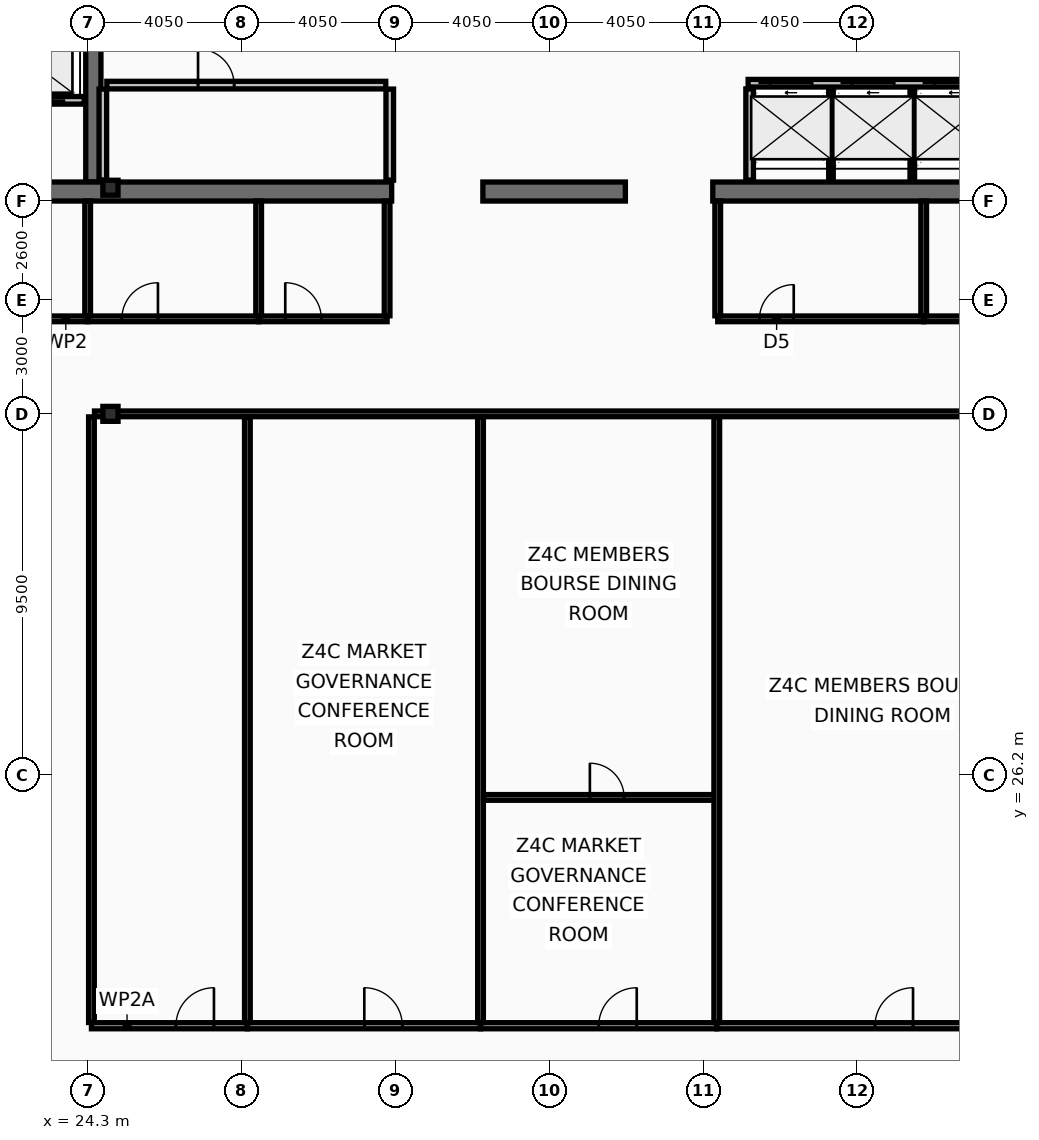
"""IFC4 building model, lengths in metres.
Left out: names, types, materials, properties, quantities, classifications, styles, units other than length and angle.
Written with IfcOpenShell. Run it as: python <this file> out.ifc"""

import sys

from ifc_helpers import new_model, si_unit, direction, frame, frame_2d, origin, origin_2d, place, context, subcontext, project, spatial, rectangle, i_section, extrude, element, fill, save


model = new_model("IFC4")
c1 = context("Model", 3, precision=1e-05, world=origin(), true_north=direction((0.0, 1.0)))
c2 = subcontext(c1, "Body", "Model", "MODEL_VIEW")
j1 = project(units=[si_unit("LENGTHUNIT", "METRE"), si_unit("PLANEANGLEUNIT", "RADIAN")], contexts=[c1])
p1 = place(None, origin())
s1 = spatial("IfcSite", under=j1, at=p1, CompositionType="ELEMENT")
p2 = place(p1, origin())
s2 = spatial("IfcBuilding", under=s1, at=p2, CompositionType="ELEMENT")
p3 = place(p2, frame((0.0, 0.0, 284.2)))
s3 = spatial("IfcBuildingStorey", under=s2, at=p3, CompositionType="ELEMENT", Elevation=284.2)
p4 = place(p3, frame((24.45, 41.8, 0.0), z_axis=(0.0, 0.0, 1.0), x_axis=(0.0, 1.0, 0.0)))
e1 = element("IfcWall", 1, at=p4, inside=s3, PredefinedType="SHEAR", context=c2, shape_type="SweptSolid", body=[
    extrude(rectangle(XDim=11.4, YDim=0.4, at=frame_2d((5.7, 0.0))), origin(), (0.0, 0.0, 1.0), 3.44),
])
p5 = place(p3, frame((32.3, 41.55, 0.0), z_axis=(0.0, 0.0, 1.0), x_axis=(-1.0, 0.0, 0.0)))
e2 = element("IfcWall", 2, at=p5, inside=s3, PredefinedType="SHEAR", context=c2, shape_type="SweptSolid", body=[
    extrude(rectangle(XDim=11.45, YDim=0.5, at=frame_2d((5.725, 0.0))), origin(), (0.0, 0.0, 1.0), 3.44),
])
p6 = place(p3, frame((38.45, 41.55, 0.0), z_axis=(0.0, 0.0, 1.0), x_axis=(-1.0, 0.0, 0.0)))
e3 = element("IfcWall", 3, at=p6, inside=s3, PredefinedType="SHEAR", context=c2, shape_type="SweptSolid", body=[
    extrude(rectangle(XDim=3.75, YDim=0.5, at=frame_2d((1.875, 0.0))), origin(), (0.0, 0.0, 1.0), 3.44),
])
p7 = place(p3, frame((52.05, 41.55, 0.0), z_axis=(0.0, 0.0, 1.0), x_axis=(-1.0, 0.0, 0.0)))
e4 = element("IfcWall", 4, at=p7, inside=s3, PredefinedType="SHEAR", context=c2, shape_type="SweptSolid", body=[
    extrude(rectangle(XDim=11.3, YDim=0.5, at=frame_2d((5.65, 0.0))), origin(), (0.0, 0.0, 1.0), 3.44),
])
for number, where, z_axis, x_axis in (
    (5, (24.9, 35.7, 0.0), (0.0, 0.0, 1.0), (1.0, 0.0, 0.0)),
    (6, (24.9, 41.65, 0.0), (0.0, 0.0, 1.0), (1.0, 0.0, 0.0)),
):
    element("IfcColumn", number, at=place(p3, frame(where, z_axis=z_axis, x_axis=x_axis)), inside=s3, PredefinedType="COLUMN", context=c2, shape_type="SweptSolid", body=[
        extrude(i_section(OverallWidth=0.399, OverallDepth=0.393, WebThickness=0.023, FlangeThickness=0.037, at=origin_2d()), origin(), (0.0, 0.0, 1.0), 3.6),
    ])
p8 = place(p3, frame((41.68, 44.4, 0.0), z_axis=(0.0, 0.0, 1.0), x_axis=(1.0, 0.0, 0.0)))
e7 = element("IfcWall", 7, at=p8, inside=s3, PredefinedType="PARTITIONING", context=c2, shape_type="SweptSolid", body=[
    extrude(rectangle(XDim=6.48, YDim=0.2, at=frame_2d((3.24, 0.0))), origin(), (0.0, 0.0, 1.0), 3.44),
])
p9 = place(p8, frame((0.58, 0.0, 0.0)))
e8 = element("IfcOpeningElement", 8, at=p9, cuts=e7, PredefinedType="OPENING", context=c2, shape_type="SweptSolid", body=[
    extrude(rectangle(XDim=1.1, YDim=2.18, at=frame_2d((0.55, 1.09))), frame((0.0, 0.11, 0.0), z_axis=(0.0, -1.0, 0.0), x_axis=(1.0, 0.0, 0.0)), (0.0, 0.0, 1.0), 0.22),
])
p10 = place(p8, frame((2.74, 0.0, 0.0)))
e9 = element("IfcOpeningElement", 9, at=p10, cuts=e7, PredefinedType="OPENING", context=c2, shape_type="SweptSolid", body=[
    extrude(rectangle(XDim=1.1, YDim=2.18, at=frame_2d((0.55, 1.09))), frame((0.0, 0.11, 0.0), z_axis=(0.0, -1.0, 0.0), x_axis=(1.0, 0.0, 0.0)), (0.0, 0.0, 1.0), 0.22),
])
p11 = place(p8, frame((4.9, 0.0, 0.0)))
e10 = element("IfcOpeningElement", 10, at=p11, cuts=e7, PredefinedType="OPENING", context=c2, shape_type="SweptSolid", body=[
    extrude(rectangle(XDim=1.1, YDim=2.18, at=frame_2d((0.55, 1.09))), frame((0.0, 0.11, 0.0), z_axis=(0.0, -1.0, 0.0), x_axis=(1.0, 0.0, 0.0)), (0.0, 0.0, 1.0), 0.22),
])
p12 = place(p3, frame((24.21, 43.95, 0.0), z_axis=(0.0, 0.0, 1.0), x_axis=(-1.0, 0.0, 0.0)))
e11 = element("IfcWall", 11, at=p12, inside=s3, PredefinedType="PARTITIONING", context=c2, shape_type="SweptSolid", body=[
    extrude(rectangle(XDim=2.97, YDim=0.2, at=frame_2d((1.485, 0.0))), origin(), (0.0, 0.0, 1.0), 3.44),
])
p13 = place(p12, frame((0.86, 0.0, 0.0)))
e12 = element("IfcOpeningElement", 12, at=p13, cuts=e11, PredefinedType="OPENING", context=c2, shape_type="SweptSolid", body=[
    extrude(rectangle(XDim=1.3, YDim=2.18, at=frame_2d((0.65, 1.09))), frame((0.0, 0.11, 0.0), z_axis=(0.0, -1.0, 0.0), x_axis=(1.0, 0.0, 0.0)), (0.0, 0.0, 1.0), 0.22),
])
for number, where, z_axis, x_axis in (
    (13, (24.7, 41.85, 0.0), (0.0, 0.0, 1.0), (0.0, 1.0, 0.0)),
    (14, (32.25, 41.85, 0.0), (0.0, 0.0, 1.0), (0.0, 1.0, 0.0)),
):
    element("IfcWall", number, at=place(p3, frame(where, z_axis=z_axis, x_axis=x_axis)), inside=s3, PredefinedType="PARTITIONING", context=c2, shape_type="SweptSolid", body=[
        extrude(rectangle(XDim=2.395, YDim=0.2, at=frame_2d((1.198, 0.0))), origin(), (0.0, 0.0, 1.0), 3.44),
    ])
p14 = place(p3, frame((24.805, 44.35, 0.0), z_axis=(0.0, 0.0, 1.0), x_axis=(1.0, 0.0, 0.0)))
e15 = element("IfcWall", 15, at=p14, inside=s3, PredefinedType="PARTITIONING", context=c2, shape_type="SweptSolid", body=[
    extrude(rectangle(XDim=7.34, YDim=0.2, at=frame_2d((3.67, 0.0))), origin(), (0.0, 0.0, 1.0), 3.44),
])
p15 = place(p14, frame((2.4, 0.0, 0.0)))
e16 = element("IfcOpeningElement", 16, at=p15, cuts=e15, PredefinedType="OPENING", context=c2, shape_type="SweptSolid", body=[
    extrude(rectangle(XDim=0.95, YDim=2.1, at=frame_2d((0.475, 1.05))), frame((0.0, 0.11, 0.0), z_axis=(0.0, -1.0, 0.0), x_axis=(1.0, 0.0, 0.0)), (0.0, 0.0, 1.0), 0.22),
])
p16 = place(p3, frame((41.72, 41.85, 0.0), z_axis=(0.0, 0.0, 1.0), x_axis=(0.0, 1.0, 0.0)))
e17 = element("IfcWall", 17, at=p16, inside=s3, PredefinedType="PARTITIONING", context=c2, shape_type="SweptSolid", body=[
    extrude(rectangle(XDim=2.4, YDim=0.2, at=frame_2d((1.2, 0.0))), origin(), (0.0, 0.0, 1.0), 3.44),
])
for number, where, z_axis, x_axis in (
    (18, (43.86, 41.85, 0.0), (0.0, 0.0, 1.0), (0.0, 1.0, 0.0)),
    (19, (46.0, 41.85, 0.0), (0.0, 0.0, 1.0), (0.0, 1.0, 0.0)),
):
    element("IfcWall", number, at=place(p3, frame(where, z_axis=z_axis, x_axis=x_axis)), inside=s3, PredefinedType="PARTITIONING", context=c2, shape_type="SweptSolid", body=[
        extrude(rectangle(XDim=2.4, YDim=0.12, at=frame_2d((1.2, 0.0))), origin(), (0.0, 0.0, 1.0), 3.44),
    ])
p17 = place(p3, frame((20.95, 38.2, 0.0), z_axis=(0.0, 0.0, 1.0), x_axis=(1.0, 0.0, 0.0)))
e20 = element("IfcWall", 20, at=p17, inside=s3, PredefinedType="PARTITIONING", context=c2, shape_type="SweptSolid", body=[
    extrude(rectangle(XDim=3.35, YDim=0.15, at=frame_2d((1.675, 0.0))), origin(), (0.0, 0.0, 1.0), 3.44),
])
p18 = place(p17, frame((0.9, 0.0, 0.0)))
e21 = element("IfcOpeningElement", 21, at=p18, cuts=e20, PredefinedType="OPENING", context=c2, shape_type="SweptSolid", body=[
    extrude(rectangle(XDim=0.95, YDim=2.05, at=frame_2d((0.475, 1.025))), frame((0.0, 0.085, 0.0), z_axis=(0.0, -1.0, 0.0), x_axis=(1.0, 0.0, 0.0)), (0.0, 0.0, 1.0), 0.17),
])
p19 = place(p3, frame((24.3, 38.2, 0.0), z_axis=(0.0, 0.0, 1.0), x_axis=(1.0, 0.0, 0.0)))
e22 = element("IfcWall", 22, at=p19, inside=s3, PredefinedType="PARTITIONING", context=c2, shape_type="SweptSolid", body=[
    extrude(rectangle(XDim=4.5, YDim=0.15, at=frame_2d((2.25, 0.0))), origin(), (0.0, 0.0, 1.0), 2.78),
])
p20 = place(p19, frame((0.9, 0.0, 0.0)))
e23 = element("IfcOpeningElement", 23, at=p20, cuts=e22, PredefinedType="OPENING", context=c2, shape_type="SweptSolid", body=[
    extrude(rectangle(XDim=0.95, YDim=2.05, at=frame_2d((0.475, 1.025))), frame((0.0, 0.085, 0.0), z_axis=(0.0, -1.0, 0.0), x_axis=(1.0, 0.0, 0.0)), (0.0, 0.0, 1.0), 0.17),
])
p21 = place(p3, frame((28.8, 38.2, 0.0), z_axis=(0.0, 0.0, 1.0), x_axis=(1.0, 0.0, 0.0)))
e24 = element("IfcWall", 24, at=p21, inside=s3, PredefinedType="PARTITIONING", context=c2, shape_type="SweptSolid", body=[
    extrude(rectangle(XDim=3.38, YDim=0.15, at=frame_2d((1.69, 0.0))), origin(), (0.0, 0.0, 1.0), 2.78),
])
p22 = place(p21, frame((0.7, 0.0, 0.0)))
e25 = element("IfcOpeningElement", 25, at=p22, cuts=e24, PredefinedType="OPENING", context=c2, shape_type="SweptSolid", body=[
    extrude(rectangle(XDim=0.95, YDim=2.05, at=frame_2d((0.475, 1.025))), frame((0.0, 0.085, 0.0), z_axis=(0.0, -1.0, 0.0), x_axis=(1.0, 0.0, 0.0)), (0.0, 0.0, 1.0), 0.17),
])
for number, where, z_axis, x_axis in (
    (26, (24.3, 38.28, 0.0), (0.0, 0.0, 1.0), (0.0, 1.0, 0.0)),
    (27, (28.8, 38.28, 0.0), (0.0, 0.0, 1.0), (0.0, 1.0, 0.0)),
    (28, (32.18, 38.28, 0.0), (0.0, 0.0, 1.0), (0.0, 1.0, 0.0)),
):
    element("IfcWall", number, at=place(p3, frame(where, z_axis=z_axis, x_axis=x_axis)), inside=s3, PredefinedType="PARTITIONING", context=c2, shape_type="SweptSolid", body=[
        extrude(rectangle(XDim=3.02, YDim=0.15, at=frame_2d((1.51, 0.0))), origin(), (0.0, 0.0, 1.0), 3.44),
    ])
p23 = place(p3, frame((40.88, 38.2, 0.0), z_axis=(0.0, 0.0, 1.0), x_axis=(1.0, 0.0, 0.0)))
e29 = element("IfcWall", 29, at=p23, inside=s3, PredefinedType="PARTITIONING", context=c2, shape_type="SweptSolid", body=[
    extrude(rectangle(XDim=5.42, YDim=0.15, at=frame_2d((2.71, 0.0))), origin(), (0.0, 0.0, 1.0), 2.78),
])
p24 = place(p23, frame((1.1, 0.0, 0.0)))
e30 = element("IfcOpeningElement", 30, at=p24, cuts=e29, PredefinedType="OPENING", context=c2, shape_type="SweptSolid", body=[
    extrude(rectangle(XDim=0.9, YDim=2.05, at=frame_2d((0.45, 1.025))), frame((0.0, 0.085, 0.0), z_axis=(0.0, -1.0, 0.0), x_axis=(1.0, 0.0, 0.0)), (0.0, 0.0, 1.0), 0.17),
])
p25 = place(p3, frame((46.3, 38.2, 0.0), z_axis=(0.0, 0.0, 1.0), x_axis=(1.0, 0.0, 0.0)))
e31 = element("IfcWall", 31, at=p25, inside=s3, PredefinedType="PARTITIONING", context=c2, shape_type="SweptSolid", body=[
    extrude(rectangle(XDim=5.65, YDim=0.15, at=frame_2d((2.825, 0.0))), origin(), (0.0, 0.0, 1.0), 2.78),
])
p26 = place(p25, frame((1.1, 0.0, 0.0)))
e32 = element("IfcOpeningElement", 32, at=p26, cuts=e31, PredefinedType="OPENING", context=c2, shape_type="SweptSolid", body=[
    extrude(rectangle(XDim=1.0, YDim=2.05, at=frame_2d((0.5, 1.025))), frame((0.0, 0.085, 0.0), z_axis=(0.0, -1.0, 0.0), x_axis=(1.0, 0.0, 0.0)), (0.0, 0.0, 1.0), 0.17),
])
for number, where, z_axis, x_axis in (
    (33, (40.88, 38.28, 0.0), (0.0, 0.0, 1.0), (0.0, 1.0, 0.0)),
    (34, (46.3, 38.28, 0.0), (0.0, 0.0, 1.0), (0.0, 1.0, 0.0)),
):
    element("IfcWall", number, at=place(p3, frame(where, z_axis=z_axis, x_axis=x_axis)), inside=s3, PredefinedType="PARTITIONING", context=c2, shape_type="SweptSolid", body=[
        extrude(rectangle(XDim=3.02, YDim=0.15, at=frame_2d((1.51, 0.0))), origin(), (0.0, 0.0, 1.0), 3.44),
    ])
p27 = place(p3, frame((24.4, 19.685, 0.0), z_axis=(0.0, 0.0, 1.0), x_axis=(0.0, 1.0, 0.0)))
e35 = element("IfcWall", 35, at=p27, inside=s3, PredefinedType="PARTITIONING", context=c2, shape_type="SweptSolid", body=[
    extrude(rectangle(XDim=15.935, YDim=0.15, at=frame_2d((7.968, 0.0))), origin(), (0.0, 0.0, 1.0), 2.78),
])
p28 = place(p3, frame((24.48, 35.7, 0.0), z_axis=(0.0, 0.0, 1.0), x_axis=(1.0, 0.0, 0.0)))
e36 = element("IfcWall", 36, at=p28, inside=s3, PredefinedType="PARTITIONING", context=c2, shape_type="SweptSolid", body=[
    extrude(rectangle(XDim=25.02, YDim=0.15, at=frame_2d((12.51, 0.0))), origin(), (0.0, 0.0, 1.0), 2.78),
])
p29 = place(p3, frame((24.4, 19.6, 0.0), z_axis=(0.0, 0.0, 1.0), x_axis=(1.0, 0.0, 0.0)))
e37 = element("IfcWall", 37, at=p29, inside=s3, PredefinedType="PARTITIONING", context=c2, shape_type="SweptSolid", body=[
    extrude(rectangle(XDim=4.104, YDim=0.16, at=frame_2d((2.052, 0.0))), origin(), (0.0, 0.0, 1.0), 2.78),
])
p30 = place(p29, frame((2.223, 0.0, 0.0)))
e38 = element("IfcOpeningElement", 38, at=p30, cuts=e37, PredefinedType="OPENING", context=c2, shape_type="SweptSolid", body=[
    extrude(rectangle(XDim=1.0, YDim=2.05, at=frame_2d((0.5, 1.025))), frame((0.0, 0.09, 0.0), z_axis=(0.0, -1.0, 0.0), x_axis=(1.0, 0.0, 0.0)), (0.0, 0.0, 1.0), 0.18),
])
p31 = place(p3, frame((28.503, 19.6, 0.0), z_axis=(0.0, 0.0, 1.0), x_axis=(1.0, 0.0, 0.0)))
e39 = element("IfcWall", 39, at=p31, inside=s3, PredefinedType="PARTITIONING", context=c2, shape_type="SweptSolid", body=[
    extrude(rectangle(XDim=6.135, YDim=0.16, at=frame_2d((3.067, 0.0))), origin(), (0.0, 0.0, 1.0), 2.78),
])
p32 = place(p31, frame((3.077, 0.0, 0.0)))
e40 = element("IfcOpeningElement", 40, at=p32, cuts=e39, PredefinedType="OPENING", context=c2, shape_type="SweptSolid", body=[
    extrude(rectangle(XDim=1.0, YDim=2.05, at=frame_2d((0.5, 1.025))), frame((0.0, 0.09, 0.0), z_axis=(0.0, -1.0, 0.0), x_axis=(1.0, 0.0, 0.0)), (0.0, 0.0, 1.0), 0.18),
])
p33 = place(p3, frame((28.503, 19.685, 0.0), z_axis=(0.0, 0.0, 1.0), x_axis=(0.0, 1.0, 0.0)))
e41 = element("IfcWall", 41, at=p33, inside=s3, PredefinedType="PARTITIONING", context=c2, shape_type="SweptSolid", body=[
    extrude(rectangle(XDim=15.935, YDim=0.15, at=frame_2d((7.968, 0.0))), origin(), (0.0, 0.0, 1.0), 3.03),
])
p34 = place(p3, frame((34.638, 19.6, 0.0), z_axis=(0.0, 0.0, 1.0), x_axis=(1.0, 0.0, 0.0)))
e42 = element("IfcWall", 42, at=p34, inside=s3, PredefinedType="PARTITIONING", context=c2, shape_type="SweptSolid", body=[
    extrude(rectangle(XDim=6.217, YDim=0.16, at=frame_2d((3.108, 0.0))), origin(), (0.0, 0.0, 1.0), 3.44),
])
p35 = place(p34, frame((3.111, 0.0, 0.0)))
e43 = element("IfcOpeningElement", 43, at=p35, cuts=e42, PredefinedType="OPENING", context=c2, shape_type="SweptSolid", body=[
    extrude(rectangle(XDim=1.0, YDim=2.05, at=frame_2d((0.5, 1.025))), frame((0.0, 0.09, 0.0), z_axis=(0.0, -1.0, 0.0), x_axis=(1.0, 0.0, 0.0)), (0.0, 0.0, 1.0), 0.18),
])
p36 = place(p3, frame((34.638, 19.685, 0.0), z_axis=(0.0, 0.0, 1.0), x_axis=(0.0, 1.0, 0.0)))
e44 = element("IfcWall", 44, at=p36, inside=s3, PredefinedType="PARTITIONING", context=c2, shape_type="SweptSolid", body=[
    extrude(rectangle(XDim=15.935, YDim=0.15, at=frame_2d((7.968, 0.0))), origin(), (0.0, 0.0, 1.0), 3.03),
])
p37 = place(p3, frame((34.718, 25.607, 0.0), z_axis=(0.0, 0.0, 1.0), x_axis=(1.0, 0.0, 0.0)))
e45 = element("IfcWall", 45, at=p37, inside=s3, PredefinedType="PARTITIONING", context=c2, shape_type="SweptSolid", body=[
    extrude(rectangle(XDim=6.057, YDim=0.15, at=frame_2d((3.028, 0.0))), origin(), (0.0, 0.0, 1.0), 3.44),
])
p38 = place(p37, frame((2.798, 0.0, 0.0)))
e46 = element("IfcOpeningElement", 46, at=p38, cuts=e45, PredefinedType="OPENING", context=c2, shape_type="SweptSolid", body=[
    extrude(rectangle(XDim=0.9, YDim=2.05, at=frame_2d((0.45, 1.025))), frame((0.0, 0.085, 0.0), z_axis=(0.0, -1.0, 0.0), x_axis=(1.0, 0.0, 0.0)), (0.0, 0.0, 1.0), 0.17),
])
p39 = place(p3, frame((40.855, 19.6, 0.0), z_axis=(0.0, 0.0, 1.0), x_axis=(1.0, 0.0, 0.0)))
e47 = element("IfcWall", 47, at=p39, inside=s3, PredefinedType="PARTITIONING", context=c2, shape_type="SweptSolid", body=[
    extrude(rectangle(XDim=8.725, YDim=0.16, at=frame_2d((4.363, 0.0))), origin(), (0.0, 0.0, 1.0), 2.78),
])
p40 = place(p39, frame((4.165, 0.0, 0.0)))
e48 = element("IfcOpeningElement", 48, at=p40, cuts=e47, PredefinedType="OPENING", context=c2, shape_type="SweptSolid", body=[
    extrude(rectangle(XDim=1.0, YDim=2.05, at=frame_2d((0.5, 1.025))), frame((0.0, 0.09, 0.0), z_axis=(0.0, -1.0, 0.0), x_axis=(1.0, 0.0, 0.0)), (0.0, 0.0, 1.0), 0.18),
])
p41 = place(p3, frame((40.855, 19.685, 0.0), z_axis=(0.0, 0.0, 1.0), x_axis=(0.0, 1.0, 0.0)))
e49 = element("IfcWall", 49, at=p41, inside=s3, PredefinedType="PARTITIONING", context=c2, shape_type="SweptSolid", body=[
    extrude(rectangle(XDim=15.935, YDim=0.15, at=frame_2d((7.968, 0.0))), origin(), (0.0, 0.0, 1.0), 3.03),
])
p42 = place(p9, origin())
e50 = element("IfcDoor", 50, at=p42, inside=s3, OperationType="SLIDING_TO_LEFT", PredefinedType="DOOR", context=c2, shape_type="SweptSolid", body=[
    extrude(rectangle(XDim=1.1, YDim=2.18, at=frame_2d((0.55, 1.09))), frame((0.0, 0.025, 0.0), z_axis=(0.0, -1.0, 0.0), x_axis=(1.0, 0.0, 0.0)), (0.0, 0.0, 1.0), 0.05),
])
fill(e8, e50)
p43 = place(p10, origin())
e51 = element("IfcDoor", 51, at=p43, inside=s3, OperationType="SLIDING_TO_LEFT", PredefinedType="DOOR", context=c2, shape_type="SweptSolid", body=[
    extrude(rectangle(XDim=1.1, YDim=2.18, at=frame_2d((0.55, 1.09))), frame((0.0, 0.025, 0.0), z_axis=(0.0, -1.0, 0.0), x_axis=(1.0, 0.0, 0.0)), (0.0, 0.0, 1.0), 0.05),
])
fill(e9, e51)
p44 = place(p11, origin())
e52 = element("IfcDoor", 52, at=p44, inside=s3, OperationType="SLIDING_TO_LEFT", PredefinedType="DOOR", context=c2, shape_type="SweptSolid", body=[
    extrude(rectangle(XDim=1.1, YDim=2.18, at=frame_2d((0.55, 1.09))), frame((0.0, 0.025, 0.0), z_axis=(0.0, -1.0, 0.0), x_axis=(1.0, 0.0, 0.0)), (0.0, 0.0, 1.0), 0.05),
])
fill(e10, e52)
p45 = place(p15, origin())
e53 = element("IfcDoor", 53, at=p45, inside=s3, OperationType="SINGLE_SWING_LEFT", PredefinedType="DOOR", context=c2, shape_type="SweptSolid", body=[
    extrude(rectangle(XDim=0.95, YDim=2.1, at=frame_2d((0.475, 1.05))), frame((0.0, 0.025, 0.0), z_axis=(0.0, -1.0, 0.0), x_axis=(1.0, 0.0, 0.0)), (0.0, 0.0, 1.0), 0.05),
])
fill(e16, e53)
p46 = place(p20, origin())
e54 = element("IfcDoor", 54, at=p46, inside=s3, OperationType="SINGLE_SWING_RIGHT", PredefinedType="DOOR", context=c2, shape_type="SweptSolid", body=[
    extrude(rectangle(XDim=0.95, YDim=2.05, at=frame_2d((0.475, 1.025))), frame((0.0, 0.025, 0.0), z_axis=(0.0, -1.0, 0.0), x_axis=(1.0, 0.0, 0.0)), (0.0, 0.0, 1.0), 0.05),
])
fill(e23, e54)
p47 = place(p22, origin())
e55 = element("IfcDoor", 55, at=p47, inside=s3, OperationType="SINGLE_SWING_LEFT", PredefinedType="DOOR", context=c2, shape_type="SweptSolid", body=[
    extrude(rectangle(XDim=0.95, YDim=2.05, at=frame_2d((0.475, 1.025))), frame((0.0, 0.025, 0.0), z_axis=(0.0, -1.0, 0.0), x_axis=(1.0, 0.0, 0.0)), (0.0, 0.0, 1.0), 0.05),
])
fill(e25, e55)
p48 = place(p24, origin())
e56 = element("IfcDoor", 56, at=p48, inside=s3, OperationType="SINGLE_SWING_RIGHT", PredefinedType="DOOR", context=c2, shape_type="SweptSolid", body=[
    extrude(rectangle(XDim=0.9, YDim=2.05, at=frame_2d((0.45, 1.025))), frame((0.0, 0.025, 0.0), z_axis=(0.0, -1.0, 0.0), x_axis=(1.0, 0.0, 0.0)), (0.0, 0.0, 1.0), 0.05),
])
fill(e30, e56)
p49 = place(p30, origin())
e57 = element("IfcDoor", 57, at=p49, inside=s3, OperationType="SINGLE_SWING_RIGHT", PredefinedType="DOOR", context=c2, shape_type="SweptSolid", body=[
    extrude(rectangle(XDim=1.0, YDim=2.05, at=frame_2d((0.5, 1.025))), frame((0.0, 0.025, 0.0), z_axis=(0.0, -1.0, 0.0), x_axis=(1.0, 0.0, 0.0)), (0.0, 0.0, 1.0), 0.05),
])
fill(e38, e57)
p50 = place(p32, origin())
e58 = element("IfcDoor", 58, at=p50, inside=s3, OperationType="SINGLE_SWING_LEFT", PredefinedType="DOOR", context=c2, shape_type="SweptSolid", body=[
    extrude(rectangle(XDim=1.0, YDim=2.05, at=frame_2d((0.5, 1.025))), frame((0.0, 0.025, 0.0), z_axis=(0.0, -1.0, 0.0), x_axis=(1.0, 0.0, 0.0)), (0.0, 0.0, 1.0), 0.05),
])
fill(e40, e58)
p51 = place(p35, origin())
e59 = element("IfcDoor", 59, at=p51, inside=s3, OperationType="SINGLE_SWING_RIGHT", PredefinedType="DOOR", context=c2, shape_type="SweptSolid", body=[
    extrude(rectangle(XDim=1.0, YDim=2.05, at=frame_2d((0.5, 1.025))), frame((0.0, 0.025, 0.0), z_axis=(0.0, -1.0, 0.0), x_axis=(1.0, 0.0, 0.0)), (0.0, 0.0, 1.0), 0.05),
])
fill(e43, e59)
p52 = place(p38, origin())
e60 = element("IfcDoor", 60, at=p52, inside=s3, OperationType="SINGLE_SWING_LEFT", PredefinedType="DOOR", context=c2, shape_type="SweptSolid", body=[
    extrude(rectangle(XDim=0.9, YDim=2.05, at=frame_2d((0.45, 1.025))), frame((0.0, 0.025, 0.0), z_axis=(0.0, -1.0, 0.0), x_axis=(1.0, 0.0, 0.0)), (0.0, 0.0, 1.0), 0.05),
])
fill(e46, e60)
p53 = place(p40, origin())
e61 = element("IfcDoor", 61, at=p53, inside=s3, OperationType="SINGLE_SWING_RIGHT", PredefinedType="DOOR", context=c2, shape_type="SweptSolid", body=[
    extrude(rectangle(XDim=1.0, YDim=2.05, at=frame_2d((0.5, 1.025))), frame((0.0, 0.025, 0.0), z_axis=(0.0, -1.0, 0.0), x_axis=(1.0, 0.0, 0.0)), (0.0, 0.0, 1.0), 0.05),
])
fill(e48, e61)
save(model, sys.argv[1])
